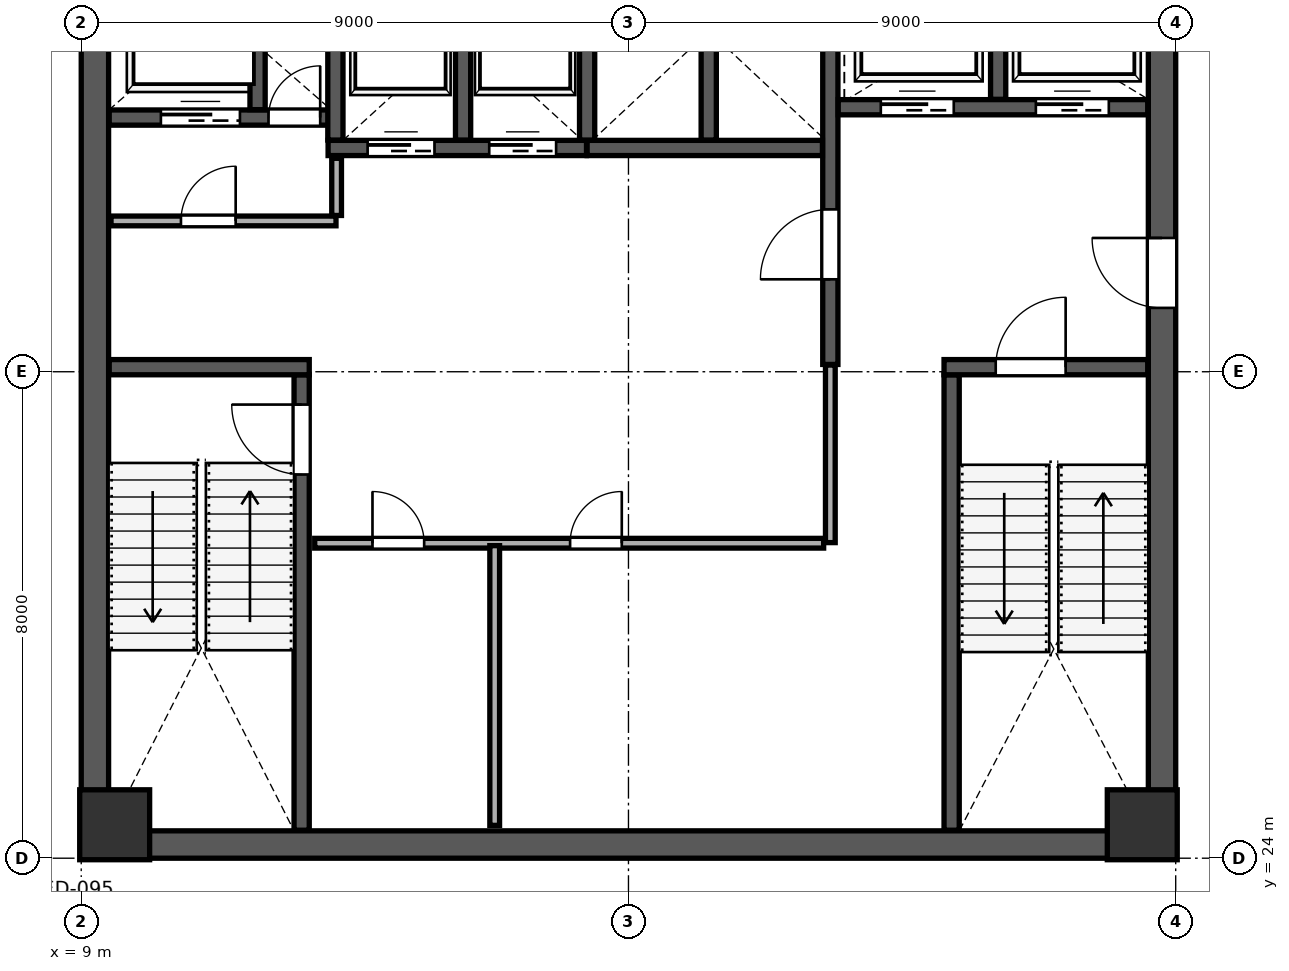
"""IFC4 building model, lengths in metres.
Left out: names, types, materials, properties, quantities, classifications, styles, units other than length and angle.
Written with IfcOpenShell. Run it as: python <this file> out.ifc"""

import sys

from ifc_helpers import new_model, si_unit, direction, frame, frame_2d, origin, origin_2d, place, context, subcontext, project, spatial, rectangle, extrude, source, transform, mapped, element, fill, save


model = new_model("IFC4")
c1 = context("Model", 3, precision=1e-05, world=origin(), true_north=direction((0.0, 1.0)))
c2 = subcontext(c1, "Body", "Model", "MODEL_VIEW")
j1 = project(units=[si_unit("LENGTHUNIT", "METRE"), si_unit("PLANEANGLEUNIT", "RADIAN")], contexts=[c1])
p1 = place(None, origin())
s1 = spatial("IfcSite", under=j1, at=p1, CompositionType="ELEMENT")
p2 = place(p1, origin())
s2 = spatial("IfcBuilding", under=s1, at=p2, CompositionType="ELEMENT")
p3 = place(p2, frame((0.0, 0.0, 158.2)))
s3 = spatial("IfcBuildingStorey", under=s2, at=p3, CompositionType="ELEMENT", Elevation=158.2)
m1 = source(origin(), c2, "Body", "SweptSolid", [
    extrude(rectangle(XDim=1.15, YDim=1.15, at=origin_2d()), origin(), (0.0, 0.0, 1.0), 4.198),
])
for number, where, z_axis, x_axis in (
    (1, (9.55, 24.55, 0.001), (0.0, 0.0, 1.0), (1.0, 0.0, 0.0)),
    (2, (26.45, 24.55, 0.001), (0.0, 0.0, 1.0), (1.0, 0.0, 0.0)),
):
    element("IfcColumn", number, at=place(p3, frame(where, z_axis=z_axis, x_axis=x_axis)), inside=s3, PredefinedType="COLUMN", context=c2, shape_type="MappedRepresentation", body=[
        mapped(m1, transform((0.0, 0.0, 0.0), scale=1.0)),
    ])
p4 = place(p3, frame((9.225, 24.45, 0.0), z_axis=(0.0, 0.0, 1.0), x_axis=(0.0, 1.0, 0.0)))
e3 = element("IfcWall", 3, at=p4, inside=s3, PredefinedType="SHEAR", context=c2, shape_type="SweptSolid", body=[
    extrude(rectangle(XDim=15.1, YDim=0.45, at=frame_2d((7.55, 0.0))), origin(), (0.0, 0.0, 1.0), 3.96),
])
p5 = place(p3, frame((26.775, 24.45, 0.0), z_axis=(0.0, 0.0, 1.0), x_axis=(0.0, 1.0, 0.0)))
e4 = element("IfcWall", 4, at=p5, inside=s3, PredefinedType="SHEAR", context=c2, shape_type="SweptSolid", body=[
    extrude(rectangle(XDim=15.1, YDim=0.45, at=frame_2d((7.55, 0.0))), origin(), (0.0, 0.0, 1.0), 3.96),
])
p6 = place(p5, frame((8.6, 0.0, 0.0)))
e5 = element("IfcOpeningElement", 5, at=p6, cuts=e4, PredefinedType="OPENING", context=c2, shape_type="SweptSolid", body=[
    extrude(rectangle(XDim=1.15, YDim=2.2, at=frame_2d((0.575, 1.1))), frame((0.0, 0.235, 0.0), z_axis=(0.0, -1.0, 0.0), x_axis=(1.0, 0.0, 0.0)), (0.0, 0.0, 1.0), 0.47),
])
p7 = place(p3, frame((9.0, 24.225, 0.0), z_axis=(0.0, 0.0, 1.0), x_axis=(1.0, 0.0, 0.0)))
e6 = element("IfcWall", 6, at=p7, inside=s3, PredefinedType="SHEAR", context=c2, shape_type="SweptSolid", body=[
    extrude(rectangle(XDim=18.0, YDim=0.45, at=frame_2d((9.0, 0.0))), origin(), (0.0, 0.0, 1.0), 3.96),
])
p8 = place(p3, frame((12.625, 24.46, 0.0), z_axis=(0.0, 0.0, 1.0), x_axis=(0.0, 1.0, 0.0)))
e7 = element("IfcWall", 7, at=p8, inside=s3, PredefinedType="SHEAR", context=c2, shape_type="SweptSolid", body=[
    extrude(rectangle(XDim=7.49, YDim=0.25, at=frame_2d((3.745, 0.0))), origin(), (0.0, 0.0, 1.0), 3.96),
])
p9 = place(p8, frame((5.85, 0.0, 0.0)))
e8 = element("IfcOpeningElement", 8, at=p9, cuts=e7, PredefinedType="OPENING", context=c2, shape_type="SweptSolid", body=[
    extrude(rectangle(XDim=1.15, YDim=2.2, at=frame_2d((0.575, 1.1))), frame((0.0, 0.135, 0.0), z_axis=(0.0, -1.0, 0.0), x_axis=(1.0, 0.0, 0.0)), (0.0, 0.0, 1.0), 0.27),
])
p10 = place(p3, frame((9.46, 32.075, 0.0), z_axis=(0.0, 0.0, 1.0), x_axis=(1.0, 0.0, 0.0)))
e9 = element("IfcWall", 9, at=p10, inside=s3, PredefinedType="SHEAR", context=c2, shape_type="SweptSolid", body=[
    extrude(rectangle(XDim=3.29, YDim=0.25, at=frame_2d((1.645, 0.0))), origin(), (0.0, 0.0, 1.0), 3.96),
])
p11 = place(p3, frame((23.315, 24.46, 0.0), z_axis=(0.0, 0.0, 1.0), x_axis=(0.0, 1.0, 0.0)))
e10 = element("IfcWall", 10, at=p11, inside=s3, PredefinedType="SHEAR", context=c2, shape_type="SweptSolid", body=[
    extrude(rectangle(XDim=7.49, YDim=0.25, at=frame_2d((3.745, 0.0))), origin(), (0.0, 0.0, 1.0), 3.96),
])
p12 = place(p3, frame((23.19, 32.075, 0.0), z_axis=(0.0, 0.0, 1.0), x_axis=(1.0, 0.0, 0.0)))
e11 = element("IfcWall", 11, at=p12, inside=s3, PredefinedType="SHEAR", context=c2, shape_type="SweptSolid", body=[
    extrude(rectangle(XDim=3.35, YDim=0.25, at=frame_2d((1.675, 0.0))), origin(), (0.0, 0.0, 1.0), 3.96),
])
p13 = place(p12, frame((0.85, 0.0, 0.0)))
e12 = element("IfcOpeningElement", 12, at=p13, cuts=e11, PredefinedType="OPENING", context=c2, shape_type="SweptSolid", body=[
    extrude(rectangle(XDim=1.15, YDim=2.2, at=frame_2d((0.575, 1.1))), frame((0.0, 0.135, 0.0), z_axis=(0.0, -1.0, 0.0), x_axis=(1.0, 0.0, 0.0)), (0.0, 0.0, 1.0), 0.27),
])
p14 = place(p3, frame((21.32, 32.12, 0.0), z_axis=(0.0, 0.0, 1.0), x_axis=(0.0, 1.0, 0.0)))
e13 = element("IfcWall", 13, at=p14, inside=s3, PredefinedType="SHEAR", context=c2, shape_type="SweptSolid", body=[
    extrude(rectangle(XDim=7.42, YDim=0.25, at=frame_2d((3.71, 0.0))), origin(), (0.0, 0.0, 1.0), 3.96),
])
p15 = place(p14, frame((1.4, 0.0, 0.0)))
e14 = element("IfcOpeningElement", 14, at=p15, cuts=e13, PredefinedType="OPENING", context=c2, shape_type="SweptSolid", body=[
    extrude(rectangle(XDim=1.15, YDim=2.2, at=frame_2d((0.575, 1.1))), frame((0.0, 0.135, 0.0), z_axis=(0.0, -1.0, 0.0), x_axis=(1.0, 0.0, 0.0)), (0.0, 0.0, 1.0), 0.27),
])
p16 = place(p3, frame((9.46, 36.18, 0.0), z_axis=(0.0, 0.0, 1.0), x_axis=(1.0, 0.0, 0.0)))
e15 = element("IfcWall", 15, at=p16, inside=s3, PredefinedType="SHEAR", context=c2, shape_type="SweptSolid", body=[
    extrude(rectangle(XDim=3.79, YDim=0.25, at=frame_2d((1.895, 0.0))), origin(), (0.0, 0.0, 1.0), 3.96),
])
p17 = place(p16, frame((2.62, 0.0, 0.0)))
e16 = element("IfcOpeningElement", 16, at=p17, cuts=e15, PredefinedType="OPENING", context=c2, shape_type="SweptSolid", body=[
    extrude(rectangle(XDim=0.85, YDim=2.1, at=frame_2d((0.425, 1.05))), frame((0.0, 0.135, 0.0), z_axis=(0.0, -1.0, 0.0), x_axis=(1.0, 0.0, 0.0)), (0.0, 0.0, 1.0), 0.27),
])
p18 = place(p16, frame((0.85, 0.0, 0.0)))
e17 = element("IfcOpeningElement", 17, at=p18, cuts=e15, PredefinedType="OPENING", context=c2, shape_type="SweptSolid", body=[
    extrude(rectangle(XDim=1.3, YDim=2.25, at=frame_2d((0.65, 1.125))), frame((0.0, 0.135, 0.0), z_axis=(0.0, -1.0, 0.0), x_axis=(1.0, 0.0, 0.0)), (0.0, 0.0, 1.0), 0.27),
])
p19 = place(p3, frame((11.9, 36.31, 0.0), z_axis=(0.0, 0.0, 1.0), x_axis=(0.0, 1.0, 0.0)))
e18 = element("IfcWall", 18, at=p19, inside=s3, PredefinedType="SHEAR", context=c2, shape_type="SweptSolid", body=[
    extrude(rectangle(XDim=3.23, YDim=0.25, at=frame_2d((1.615, 0.0))), origin(), (0.0, 0.0, 1.0), 3.96),
])
p20 = place(p3, frame((21.45, 36.35, 0.0), z_axis=(0.0, 0.0, 1.0), x_axis=(1.0, 0.0, 0.0)))
e19 = element("IfcWall", 19, at=p20, inside=s3, PredefinedType="SHEAR", context=c2, shape_type="SweptSolid", body=[
    extrude(rectangle(XDim=5.09, YDim=0.25, at=frame_2d((2.545, 0.0))), origin(), (0.0, 0.0, 1.0), 3.96),
])
p21 = place(p20, frame((0.7, 0.0, 0.0)))
e20 = element("IfcOpeningElement", 20, at=p21, cuts=e19, PredefinedType="OPENING", context=c2, shape_type="SweptSolid", body=[
    extrude(rectangle(XDim=1.2, YDim=2.2, at=frame_2d((0.6, 1.1))), frame((0.0, 0.135, 0.0), z_axis=(0.0, -1.0, 0.0), x_axis=(1.0, 0.0, 0.0)), (0.0, 0.0, 1.0), 0.27),
])
p22 = place(p20, frame((3.25, 0.0, 0.0)))
e21 = element("IfcOpeningElement", 21, at=p22, cuts=e19, PredefinedType="OPENING", context=c2, shape_type="SweptSolid", body=[
    extrude(rectangle(XDim=1.2, YDim=2.2, at=frame_2d((0.6, 1.1))), frame((0.0, 0.135, 0.0), z_axis=(0.0, -1.0, 0.0), x_axis=(1.0, 0.0, 0.0)), (0.0, 0.0, 1.0), 0.27),
])
p23 = place(p3, frame((24.08, 36.48, 0.0), z_axis=(0.0, 0.0, 1.0), x_axis=(0.0, 1.0, 0.0)))
e22 = element("IfcWall", 22, at=p23, inside=s3, PredefinedType="SHEAR", context=c2, shape_type="SweptSolid", body=[
    extrude(rectangle(XDim=3.06, YDim=0.25, at=frame_2d((1.53, 0.0))), origin(), (0.0, 0.0, 1.0), 3.96),
])
p24 = place(p3, frame((13.06, 35.68, 0.0), z_axis=(0.0, 0.0, 1.0), x_axis=(1.0, 0.0, 0.0)))
e23 = element("IfcWall", 23, at=p24, inside=s3, PredefinedType="SHEAR", context=c2, shape_type="SweptSolid", body=[
    extrude(rectangle(XDim=4.25, YDim=0.25, at=frame_2d((2.125, 0.0))), origin(), (0.0, 0.0, 1.0), 3.96),
])
p25 = place(p24, frame((0.65, 0.0, 0.0)))
e24 = element("IfcOpeningElement", 24, at=p25, cuts=e23, PredefinedType="OPENING", context=c2, shape_type="SweptSolid", body=[
    extrude(rectangle(XDim=1.1, YDim=2.2, at=frame_2d((0.55, 1.1))), frame((0.0, 0.135, 0.0), z_axis=(0.0, -1.0, 0.0), x_axis=(1.0, 0.0, 0.0)), (0.0, 0.0, 1.0), 0.27),
])
p26 = place(p24, frame((2.65, 0.0, 0.0)))
e25 = element("IfcOpeningElement", 25, at=p26, cuts=e23, PredefinedType="OPENING", context=c2, shape_type="SweptSolid", body=[
    extrude(rectangle(XDim=1.1, YDim=2.2, at=frame_2d((0.55, 1.1))), frame((0.0, 0.135, 0.0), z_axis=(0.0, -1.0, 0.0), x_axis=(1.0, 0.0, 0.0)), (0.0, 0.0, 1.0), 0.27),
])
for number, where, z_axis, x_axis in (
    (26, (13.18, 35.81, 0.0), (0.0, 0.0, 1.0), (0.0, 1.0, 0.0)),
    (27, (15.28, 35.81, 0.0), (0.0, 0.0, 1.0), (0.0, 1.0, 0.0)),
):
    element("IfcWall", number, at=place(p3, frame(where, z_axis=z_axis, x_axis=x_axis)), inside=s3, PredefinedType="SHEAR", context=c2, shape_type="SweptSolid", body=[
        extrude(rectangle(XDim=3.73, YDim=0.25, at=frame_2d((1.865, 0.0))), origin(), (0.0, 0.0, 1.0), 3.96),
    ])
p27 = place(p3, frame((17.32, 35.68, 0.0), z_axis=(0.0, 0.0, 1.0), x_axis=(1.0, 0.0, 0.0)))
e28 = element("IfcWall", 28, at=p27, inside=s3, PredefinedType="SHEAR", context=c2, shape_type="SweptSolid", body=[
    extrude(rectangle(XDim=3.87, YDim=0.25, at=frame_2d((1.935, 0.0))), origin(), (0.0, 0.0, 1.0), 3.96),
])
for number, where, z_axis, x_axis in (
    (29, (17.32, 35.81, 0.0), (0.0, 0.0, 1.0), (0.0, 1.0, 0.0)),
    (30, (19.32, 35.81, 0.0), (0.0, 0.0, 1.0), (0.0, 1.0, 0.0)),
):
    element("IfcWall", number, at=place(p3, frame(where, z_axis=z_axis, x_axis=x_axis)), inside=s3, PredefinedType="SHEAR", context=c2, shape_type="SweptSolid", body=[
        extrude(rectangle(XDim=3.73, YDim=0.25, at=frame_2d((1.865, 0.0))), origin(), (0.0, 0.0, 1.0), 3.96),
    ])
p28 = place(p3, frame((9.49, 34.48, 0.0), z_axis=(0.0, 0.0, 1.0), x_axis=(1.0, 0.0, 0.0)))
e31 = element("IfcWall", 31, at=p28, inside=s3, PredefinedType="PARTITIONING", context=c2, shape_type="SweptSolid", body=[
    extrude(rectangle(XDim=3.7, YDim=0.16, at=frame_2d((1.85, 0.0))), origin(), (0.0, 0.0, 1.0), 3.96),
])
p29 = place(p28, frame((1.15, 0.0, 0.0)))
e32 = element("IfcOpeningElement", 32, at=p29, cuts=e31, PredefinedType="OPENING", context=c2, shape_type="SweptSolid", body=[
    extrude(rectangle(XDim=0.9, YDim=2.15, at=frame_2d((0.45, 1.075))), frame((0.0, 0.09, 0.0), z_axis=(0.0, -1.0, 0.0), x_axis=(1.0, 0.0, 0.0)), (0.0, 0.0, 1.0), 0.18),
])
p30 = place(p3, frame((13.2, 34.57, 0.0), z_axis=(0.0, 0.0, 1.0), x_axis=(0.0, 1.0, 0.0)))
e33 = element("IfcWall", 33, at=p30, inside=s3, PredefinedType="PARTITIONING", context=c2, shape_type="SweptSolid", body=[
    extrude(rectangle(XDim=0.94, YDim=0.16, at=frame_2d((0.47, 0.0))), origin(), (0.0, 0.0, 1.0), 3.96),
])
p31 = place(p3, frame((12.84, 29.18, 0.0), z_axis=(0.0, 0.0, 1.0), x_axis=(1.0, 0.0, 0.0)))
e34 = element("IfcWall", 34, at=p31, inside=s3, PredefinedType="PARTITIONING", context=c2, shape_type="SweptSolid", body=[
    extrude(rectangle(XDim=8.37, YDim=0.16, at=frame_2d((4.185, 0.0))), origin(), (0.0, 0.0, 1.0), 3.96),
])
p32 = place(p31, frame((0.95, 0.0, 0.0)))
e35 = element("IfcOpeningElement", 35, at=p32, cuts=e34, PredefinedType="OPENING", context=c2, shape_type="SweptSolid", body=[
    extrude(rectangle(XDim=0.85, YDim=2.1, at=frame_2d((0.425, 1.05))), frame((0.0, 0.09, 0.0), z_axis=(0.0, -1.0, 0.0), x_axis=(1.0, 0.0, 0.0)), (0.0, 0.0, 1.0), 0.18),
])
p33 = place(p31, frame((4.2, 0.0, 0.0)))
e36 = element("IfcOpeningElement", 36, at=p33, cuts=e34, PredefinedType="OPENING", context=c2, shape_type="SweptSolid", body=[
    extrude(rectangle(XDim=0.85, YDim=2.1, at=frame_2d((0.425, 1.05))), frame((0.0, 0.09, 0.0), z_axis=(0.0, -1.0, 0.0), x_axis=(1.0, 0.0, 0.0)), (0.0, 0.0, 1.0), 0.18),
])
p34 = place(p3, frame((15.8, 24.54, 0.0), z_axis=(0.0, 0.0, 1.0), x_axis=(0.0, 1.0, 0.0)))
e37 = element("IfcWall", 37, at=p34, inside=s3, PredefinedType="PARTITIONING", context=c2, shape_type="SweptSolid", body=[
    extrude(rectangle(XDim=4.6, YDim=0.16, at=frame_2d((2.3, 0.0))), origin(), (0.0, 0.0, 1.0), 3.96),
])
p35 = place(p3, frame((21.32, 29.19, 0.0), z_axis=(0.0, 0.0, 1.0), x_axis=(0.0, 1.0, 0.0)))
e38 = element("IfcWall", 38, at=p35, inside=s3, PredefinedType="PARTITIONING", context=c2, shape_type="SweptSolid", body=[
    extrude(rectangle(XDim=2.92, YDim=0.16, at=frame_2d((1.46, 0.0))), origin(), (0.0, 0.0, 1.0), 3.96),
])
p36 = place(p3, frame((7.213, 23.391, 0.0), z_axis=(0.0, 0.0, 1.0), x_axis=(0.906304602938, -0.422625089996, 0.0)))
e39 = element("IfcWall", 39, at=p36, inside=s3, PredefinedType="PARTITIONING", context=c2, shape_type="SweptSolid", body=[
    extrude(rectangle(XDim=19.61, YDim=0.16, at=frame_2d((9.805, 0.0))), origin(), (0.0, 0.0, 1.0), 3.96),
])
p37 = place(p36, frame((1.45, 0.0, 0.0)))
e40 = element("IfcOpeningElement", 40, at=p37, cuts=e39, PredefinedType="OPENING", context=c2, shape_type="SweptSolid", body=[
    extrude(rectangle(XDim=0.95, YDim=2.15, at=frame_2d((0.475, 1.075))), frame((0.0, 0.09, 0.0), z_axis=(0.0, -1.0, 0.0), x_axis=(1.0, 0.0, 0.0)), (0.0, 0.0, 1.0), 0.18),
])
p38 = place(p36, frame((8.7, 0.0, 0.0)))
e41 = element("IfcOpeningElement", 41, at=p38, cuts=e39, PredefinedType="OPENING", context=c2, shape_type="SweptSolid", body=[
    extrude(rectangle(XDim=0.95, YDim=2.15, at=frame_2d((0.475, 1.075))), frame((0.0, 0.09, 0.0), z_axis=(0.0, -1.0, 0.0), x_axis=(1.0, 0.0, 0.0)), (0.0, 0.0, 1.0), 0.18),
])
p39 = place(p3, frame((1.756, 27.635, 0.0), z_axis=(0.0, 0.0, 1.0), x_axis=(0.422615732035, 0.906308966653, 0.0)))
e42 = element("IfcWall", 42, at=p39, inside=s3, PredefinedType="PARTITIONING", context=c2, shape_type="SweptSolid", body=[
    extrude(rectangle(XDim=23.34, YDim=0.135, at=frame_2d((11.67, 0.0))), origin(), (0.0, 0.0, 1.0), 3.96),
])
p40 = place(p39, frame((1.3, 0.0, 0.0)))
e43 = element("IfcOpeningElement", 43, at=p40, cuts=e42, PredefinedType="OPENING", context=c2, shape_type="SweptSolid", body=[
    extrude(rectangle(XDim=0.95, YDim=2.15, at=frame_2d((0.475, 1.075))), frame((0.0, 0.078, 0.0), z_axis=(0.0, -1.0, 0.0), x_axis=(1.0, 0.0, 0.0)), (0.0, 0.0, 1.0), 0.155),
])
p41 = place(p39, frame((9.4, 0.0, 0.0)))
e44 = element("IfcOpeningElement", 44, at=p41, cuts=e42, PredefinedType="OPENING", context=c2, shape_type="SweptSolid", body=[
    extrude(rectangle(XDim=0.95, YDim=2.15, at=frame_2d((0.475, 1.075))), frame((0.0, 0.078, 0.0), z_axis=(0.0, -1.0, 0.0), x_axis=(1.0, 0.0, 0.0)), (0.0, 0.0, 1.0), 0.155),
])
p42 = place(p3, frame((23.256, 11.299, 0.0), z_axis=(0.0, 0.0, 1.0), x_axis=(0.422623489462, 0.906305349292, 0.0)))
e45 = element("IfcWall", 45, at=p42, inside=s3, PredefinedType="PARTITIONING", context=c2, shape_type="SweptSolid", body=[
    extrude(rectangle(XDim=21.48, YDim=0.16, at=frame_2d((10.74, 0.0))), origin(), (0.0, 0.0, 1.0), 3.96),
])
m2 = source(origin(), c2, "Body", "SweptSolid", [
    extrude(rectangle(XDim=1.15, YDim=2.2, at=frame_2d((0.575, 1.1))), frame((0.0, 0.025, 0.0), z_axis=(0.0, -1.0, 0.0), x_axis=(1.0, 0.0, 0.0)), (0.0, 0.0, 1.0), 0.05),
])
p43 = place(p9, origin())
e46 = element("IfcDoor", 46, at=p43, inside=s3, OperationType="SINGLE_SWING_RIGHT", PredefinedType="DOOR", context=c2, shape_type="MappedRepresentation", body=[
    mapped(m2, transform((0.0, 0.0, 0.0), scale=1.0)),
])
fill(e8, e46)
m3 = source(origin(), c2, "Body", "SweptSolid", [
    extrude(rectangle(XDim=1.15, YDim=2.2, at=frame_2d((0.575, 1.1))), frame((0.0, 0.025, 0.0), z_axis=(0.0, -1.0, 0.0), x_axis=(1.0, 0.0, 0.0)), (0.0, 0.0, 1.0), 0.05),
])
p44 = place(p15, origin())
e47 = element("IfcDoor", 47, at=p44, inside=s3, OperationType="SINGLE_SWING_LEFT", PredefinedType="DOOR", context=c2, shape_type="MappedRepresentation", body=[
    mapped(m3, transform((0.0, 0.0, 0.0), scale=1.0)),
])
fill(e14, e47)
p45 = place(p13, origin())
e48 = element("IfcDoor", 48, at=p45, inside=s3, OperationType="SINGLE_SWING_RIGHT", PredefinedType="DOOR", context=c2, shape_type="MappedRepresentation", body=[
    mapped(m2, transform((0.0, 0.0, 0.0), scale=1.0)),
])
fill(e12, e48)
p46 = place(p6, origin())
e49 = element("IfcDoor", 49, at=p46, inside=s3, OperationType="SINGLE_SWING_RIGHT", PredefinedType="DOOR", context=c2, shape_type="MappedRepresentation", body=[
    mapped(m3, transform((0.0, 0.0, 0.0), scale=1.0)),
])
fill(e5, e49)
m4 = source(origin(), c2, "Body", "SweptSolid", [
    extrude(rectangle(XDim=0.85, YDim=2.1, at=frame_2d((0.425, 1.05))), frame((0.0, 0.025, 0.0), z_axis=(0.0, -1.0, 0.0), x_axis=(1.0, 0.0, 0.0)), (0.0, 0.0, 1.0), 0.05),
])
p47 = place(p17, origin())
e50 = element("IfcDoor", 50, at=p47, inside=s3, OperationType="SINGLE_SWING_RIGHT", PredefinedType="DOOR", context=c2, shape_type="MappedRepresentation", body=[
    mapped(m4, transform((0.0, 0.0, 0.0), scale=1.0)),
])
fill(e16, e50)
m5 = source(origin(), c2, "Body", "SweptSolid", [
    extrude(rectangle(XDim=1.1, YDim=2.2, at=frame_2d((0.55, 1.1))), frame((0.0, 0.025, 0.0), z_axis=(0.0, -1.0, 0.0), x_axis=(1.0, 0.0, 0.0)), (0.0, 0.0, 1.0), 0.05),
])
p48 = place(p25, origin())
e51 = element("IfcDoor", 51, at=p48, inside=s3, OperationType="SLIDING_TO_LEFT", PredefinedType="DOOR", context=c2, shape_type="MappedRepresentation", body=[
    mapped(m5, transform((0.0, 0.0, 0.0), scale=1.0)),
])
fill(e24, e51)
p49 = place(p26, origin())
e52 = element("IfcDoor", 52, at=p49, inside=s3, OperationType="SLIDING_TO_RIGHT", PredefinedType="DOOR", context=c2, shape_type="MappedRepresentation", body=[
    mapped(m5, transform((0.0, 0.0, 0.0), scale=1.0)),
])
fill(e25, e52)
m6 = source(origin(), c2, "Body", "SweptSolid", [
    extrude(rectangle(XDim=1.2, YDim=2.2, at=frame_2d((0.6, 1.1))), frame((0.0, 0.025, 0.0), z_axis=(0.0, -1.0, 0.0), x_axis=(1.0, 0.0, 0.0)), (0.0, 0.0, 1.0), 0.05),
])
p50 = place(p21, origin())
e53 = element("IfcDoor", 53, at=p50, inside=s3, OperationType="SLIDING_TO_LEFT", PredefinedType="DOOR", context=c2, shape_type="MappedRepresentation", body=[
    mapped(m6, transform((0.0, 0.0, 0.0), scale=1.0)),
])
fill(e20, e53)
p51 = place(p22, origin())
e54 = element("IfcDoor", 54, at=p51, inside=s3, OperationType="SLIDING_TO_RIGHT", PredefinedType="DOOR", context=c2, shape_type="MappedRepresentation", body=[
    mapped(m6, transform((0.0, 0.0, 0.0), scale=1.0)),
])
fill(e21, e54)
m7 = source(origin(), c2, "Body", "SweptSolid", [
    extrude(rectangle(XDim=1.3, YDim=2.25, at=frame_2d((0.65, 1.125))), frame((0.0, 0.025, 0.0), z_axis=(0.0, -1.0, 0.0), x_axis=(1.0, 0.0, 0.0)), (0.0, 0.0, 1.0), 0.05),
])
p52 = place(p18, origin())
e55 = element("IfcDoor", 55, at=p52, inside=s3, OperationType="SLIDING_TO_LEFT", PredefinedType="DOOR", context=c2, shape_type="MappedRepresentation", body=[
    mapped(m7, transform((0.0, 0.0, 0.0), scale=1.0)),
])
fill(e17, e55)
m8 = source(origin(), c2, "Body", "SweptSolid", [
    extrude(rectangle(XDim=0.9, YDim=2.15, at=frame_2d((0.45, 1.075))), frame((0.0, 0.025, 0.0), z_axis=(0.0, -1.0, 0.0), x_axis=(1.0, 0.0, 0.0)), (0.0, 0.0, 1.0), 0.05),
])
p53 = place(p29, origin())
e56 = element("IfcDoor", 56, at=p53, inside=s3, OperationType="SINGLE_SWING_RIGHT", PredefinedType="DOOR", context=c2, shape_type="MappedRepresentation", body=[
    mapped(m8, transform((0.0, 0.0, 0.0), scale=1.0)),
])
fill(e32, e56)
p54 = place(p32, origin())
e57 = element("IfcDoor", 57, at=p54, inside=s3, OperationType="SINGLE_SWING_LEFT", PredefinedType="DOOR", context=c2, shape_type="MappedRepresentation", body=[
    mapped(m4, transform((0.0, 0.0, 0.0), scale=1.0)),
])
fill(e35, e57)
p55 = place(p33, origin())
e58 = element("IfcDoor", 58, at=p55, inside=s3, OperationType="SINGLE_SWING_RIGHT", PredefinedType="DOOR", context=c2, shape_type="MappedRepresentation", body=[
    mapped(m4, transform((0.0, 0.0, 0.0), scale=1.0)),
])
fill(e36, e58)
save(model, sys.argv[1])
